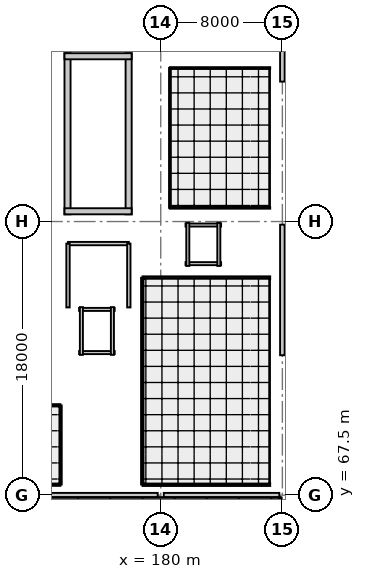
"""IFC4 building model, lengths in metres.
Left out: names, types, materials, properties, quantities, classifications, styles, units other than length and angle.
Written with IfcOpenShell. Run it as: python <this file> out.ifc"""

import sys

from ifc_helpers import new_model, si_unit, direction, frame, frame_2d, origin, origin_2d, place, context, subcontext, project, spatial, rectangle, i_section, extrude, element, fill, save


model = new_model("IFC4")
c1 = context("Model", 3, precision=1e-05, world=origin(), true_north=direction((0.0, 1.0)))
c2 = subcontext(c1, "Body", "Model", "MODEL_VIEW")
j1 = project(units=[si_unit("LENGTHUNIT", "METRE"), si_unit("PLANEANGLEUNIT", "RADIAN")], contexts=[c1])
p1 = place(None, origin())
s1 = spatial("IfcSite", under=j1, at=p1, CompositionType="ELEMENT")
p2 = place(p1, origin())
s2 = spatial("IfcBuilding", under=s1, at=p2, CompositionType="ELEMENT")
p3 = place(p2, frame((0.0, 0.0, 10.8)))
s3 = spatial("IfcBuildingStorey", under=s2, at=p3, CompositionType="ELEMENT", Elevation=10.8)
for number, where, z_axis, x_axis in (
    (1, (180.0, 67.5, 0.0), (0.0, 0.0, 1.0), (1.0, 0.0, 0.0)),
    (2, (180.0, 76.5, 0.0), (0.0, 0.0, 1.0), (1.0, 0.0, 0.0)),
    (3, (180.0, 85.5, 0.0), (0.0, 0.0, 1.0), (1.0, 0.0, 0.0)),
    (4, (180.0, 94.5, 0.0), (0.0, 0.0, 1.0), (1.0, 0.0, 0.0)),
    (5, (188.0, 67.5, 0.0), (0.0, 0.0, 1.0), (1.0, 0.0, 0.0)),
    (6, (188.0, 76.5, 0.0), (0.0, 0.0, 1.0), (1.0, 0.0, 0.0)),
    (7, (188.0, 85.5, 0.0), (0.0, 0.0, 1.0), (1.0, 0.0, 0.0)),
    (8, (188.0, 94.5, 0.0), (0.0, 0.0, 1.0), (1.0, 0.0, 0.0)),
):
    element("IfcColumn", number, at=place(p3, frame(where, z_axis=z_axis, x_axis=x_axis)), inside=s3, PredefinedType="COLUMN", context=c2, shape_type="SweptSolid", body=[
        extrude(i_section(OverallWidth=0.4, OverallDepth=0.408, WebThickness=0.021, FlangeThickness=0.021, FilletRadius=0.022, at=origin_2d()), origin(), (0.0, 0.0, 1.0), 3.6),
    ])
p4 = place(p3, frame((187.8, 67.5, 0.0), z_axis=(0.0, 0.0, 1.0), x_axis=(-1.0, 0.0, 0.0)))
e9 = element("IfcWall", 9, at=p4, inside=s3, PredefinedType="SOLIDWALL", context=c2, shape_type="SweptSolid", body=[
    extrude(rectangle(XDim=7.6, YDim=0.3, at=frame_2d((3.8, 0.0))), origin(), (0.0, 0.0, 1.0), 2.895),
])
p5 = place(p4, frame((2.75, 0.0, 0.9)))
e10 = element("IfcOpeningElement", 10, at=p5, cuts=e9, PredefinedType="OPENING", context=c2, shape_type="SweptSolid", body=[
    extrude(rectangle(XDim=2.1, YDim=1.6, at=frame_2d((1.05, 0.8))), frame((0.0, 0.16, 0.0), z_axis=(0.0, -1.0, 0.0), x_axis=(1.0, 0.0, 0.0)), (0.0, 0.0, 1.0), 0.32),
])
p6 = place(p3, frame((179.8, 67.5, 0.0), z_axis=(0.0, 0.0, 1.0), x_axis=(-1.0, 0.0, 0.0)))
e11 = element("IfcWall", 11, at=p6, inside=s3, PredefinedType="SOLIDWALL", context=c2, shape_type="SweptSolid", body=[
    extrude(rectangle(XDim=7.6, YDim=0.3, at=frame_2d((3.8, 0.0))), origin(), (0.0, 0.0, 1.0), 2.915),
])
p7 = place(p6, frame((2.9, 0.0, 0.9)))
e12 = element("IfcOpeningElement", 12, at=p7, cuts=e11, PredefinedType="OPENING", context=c2, shape_type="SweptSolid", body=[
    extrude(rectangle(XDim=1.8, YDim=1.6, at=frame_2d((0.9, 0.8))), frame((0.0, 0.16, 0.0), z_axis=(0.0, -1.0, 0.0), x_axis=(1.0, 0.0, 0.0)), (0.0, 0.0, 1.0), 0.32),
])
p8 = place(p3, frame((188.0, 85.296, 0.0), z_axis=(0.0, 0.0, 1.0), x_axis=(0.0, -1.0, 0.0)))
e13 = element("IfcWall", 13, at=p8, inside=s3, PredefinedType="SOLIDWALL", context=c2, shape_type="SweptSolid", body=[
    extrude(rectangle(XDim=8.592, YDim=0.3, at=frame_2d((4.296, 0.0))), origin(), (0.0, 0.0, 1.0), 2.895),
])
p9 = place(p8, frame((1.811, 0.0, 0.9)))
e14 = element("IfcOpeningElement", 14, at=p9, cuts=e13, PredefinedType="OPENING", context=c2, shape_type="SweptSolid", body=[
    extrude(rectangle(XDim=0.9, YDim=1.4, at=frame_2d((0.45, 0.7))), frame((0.0, 0.16, 0.0), z_axis=(0.0, -1.0, 0.0), x_axis=(1.0, 0.0, 0.0)), (0.0, 0.0, 1.0), 0.32),
])
p10 = place(p8, frame((5.756, 0.0, 0.9)))
e15 = element("IfcOpeningElement", 15, at=p10, cuts=e13, PredefinedType="OPENING", context=c2, shape_type="SweptSolid", body=[
    extrude(rectangle(XDim=1.15, YDim=1.45, at=frame_2d((0.575, 0.725))), frame((0.0, 0.16, 0.0), z_axis=(0.0, -1.0, 0.0), x_axis=(1.0, 0.0, 0.0)), (0.0, 0.0, 1.0), 0.32),
])
p11 = place(p3, frame((188.0, 103.296, 0.0), z_axis=(0.0, 0.0, 1.0), x_axis=(0.0, -1.0, 0.0)))
e16 = element("IfcWall", 16, at=p11, inside=s3, PredefinedType="SOLIDWALL", context=c2, shape_type="SweptSolid", body=[
    extrude(rectangle(XDim=8.592, YDim=0.3, at=frame_2d((4.296, 0.0))), origin(), (0.0, 0.0, 1.0), 2.775),
])
p12 = place(p11, frame((1.686, 0.0, 0.9)))
e17 = element("IfcOpeningElement", 17, at=p12, cuts=e16, PredefinedType="OPENING", context=c2, shape_type="SweptSolid", body=[
    extrude(rectangle(XDim=1.15, YDim=1.45, at=frame_2d((0.575, 0.725))), frame((0.0, 0.16, 0.0), z_axis=(0.0, -1.0, 0.0), x_axis=(1.0, 0.0, 0.0)), (0.0, 0.0, 1.0), 0.32),
])
p13 = place(p11, frame((5.756, 0.0, 0.9)))
e18 = element("IfcOpeningElement", 18, at=p13, cuts=e16, PredefinedType="OPENING", context=c2, shape_type="SweptSolid", body=[
    extrude(rectangle(XDim=1.15, YDim=1.45, at=frame_2d((0.575, 0.725))), frame((0.0, 0.16, 0.0), z_axis=(0.0, -1.0, 0.0), x_axis=(1.0, 0.0, 0.0)), (0.0, 0.0, 1.0), 0.32),
])
p14 = place(p3, frame((187.85, 54.15, 0.0), z_axis=(0.0, 0.0, 1.0), x_axis=(0.0, 1.0, 0.0)))
e19 = element("IfcWall", 19, at=p14, inside=s3, PredefinedType="PARAPET", context=c2, shape_type="SweptSolid", body=[
    extrude(rectangle(XDim=13.2, YDim=0.21, at=frame_2d((6.6, 0.0))), origin(), (0.0, 0.0, 1.0), 1.2),
])
for number, where, z_axis, x_axis in (
    (20, (177.887, 85.975, 0.0), (0.0, 0.0, 1.0), (0.0, 1.0, 0.0)),
    (21, (173.867, 96.573, 0.0), (0.0, 0.0, 1.0), (0.0, -1.0, 0.0)),
):
    element("IfcWall", number, at=place(p3, frame(where, z_axis=z_axis, x_axis=x_axis)), inside=s3, PredefinedType="SHEAR", context=c2, shape_type="SweptSolid", body=[
        extrude(rectangle(XDim=10.597, YDim=0.4, at=frame_2d((5.299, 0.0))), origin(), (0.0, 0.0, 1.0), 3.38),
    ])
p15 = place(p3, frame((178.087, 96.373, 0.0), z_axis=(0.0, 0.0, 1.0), x_axis=(-1.0, 0.0, 0.0)))
e22 = element("IfcWall", 22, at=p15, inside=s3, PredefinedType="SHEAR", context=c2, shape_type="SweptSolid", body=[
    extrude(rectangle(XDim=4.42, YDim=0.4, at=frame_2d((2.21, 0.0))), origin(), (0.0, 0.0, 1.0), 3.38),
])
p16 = place(p3, frame((173.667, 86.175, 0.0), z_axis=(0.0, 0.0, 1.0), x_axis=(1.0, 0.0, 0.0)))
e23 = element("IfcWall", 23, at=p16, inside=s3, PredefinedType="SHEAR", context=c2, shape_type="SweptSolid", body=[
    extrude(rectangle(XDim=4.42, YDim=0.4, at=frame_2d((2.21, 0.0))), origin(), (0.0, 0.0, 1.0), 3.38),
])
p17 = place(p16, frame((1.15, 0.0, 0.0)))
e24 = element("IfcOpeningElement", 24, at=p17, cuts=e23, PredefinedType="OPENING", context=c2, shape_type="SweptSolid", body=[
    extrude(rectangle(XDim=1.3, YDim=2.1, at=frame_2d((0.65, 1.05))), frame((0.0, 0.21, 0.0), z_axis=(0.0, -1.0, 0.0), x_axis=(1.0, 0.0, 0.0)), (0.0, 0.0, 1.0), 0.42),
])
p18 = place(p3, frame((174.63, 76.88, 0.0), z_axis=(0.0, 0.0, 1.0), x_axis=(1.0, 0.0, 0.0)))
e25 = element("IfcWall", 25, at=p18, inside=s3, PredefinedType="SOLIDWALL", context=c2, shape_type="SweptSolid", body=[
    extrude(rectangle(XDim=2.34, YDim=0.2, at=frame_2d((1.17, 0.0))), origin(), (0.0, 0.0, 1.0), 2.915),
])
p19 = place(p3, frame((176.97, 79.72, 0.0), z_axis=(0.0, 0.0, 1.0), x_axis=(-1.0, 0.0, 0.0)))
e26 = element("IfcWall", 26, at=p19, inside=s3, PredefinedType="SOLIDWALL", context=c2, shape_type="SweptSolid", body=[
    extrude(rectangle(XDim=2.34, YDim=0.2, at=frame_2d((1.17, 0.0))), origin(), (0.0, 0.0, 1.0), 3.355),
])
p20 = place(p19, frame((0.57, 0.0, 0.0)))
e27 = element("IfcOpeningElement", 27, at=p20, cuts=e26, PredefinedType="OPENING", context=c2, shape_type="SweptSolid", body=[
    extrude(rectangle(XDim=1.2, YDim=2.15, at=frame_2d((0.6, 1.075))), frame((0.0, 0.11, 0.0), z_axis=(0.0, -1.0, 0.0), x_axis=(1.0, 0.0, 0.0)), (0.0, 0.0, 1.0), 0.22),
])
for number, where, z_axis, x_axis in (
    (28, (174.78, 79.87, 0.0), (0.0, 0.0, 1.0), (0.0, -1.0, 0.0)),
    (29, (176.82, 76.73, 0.0), (0.0, 0.0, 1.0), (0.0, 1.0, 0.0)),
):
    element("IfcWall", number, at=place(p3, frame(where, z_axis=z_axis, x_axis=x_axis)), inside=s3, PredefinedType="SOLIDWALL", context=c2, shape_type="SweptSolid", body=[
        extrude(rectangle(XDim=3.14, YDim=0.2, at=frame_2d((1.57, 0.0))), origin(), (0.0, 0.0, 1.0), 2.915),
    ])
p21 = place(p3, frame((181.63, 82.73, 0.0), z_axis=(0.0, 0.0, 1.0), x_axis=(1.0, 0.0, 0.0)))
e30 = element("IfcWall", 30, at=p21, inside=s3, PredefinedType="SOLIDWALL", context=c2, shape_type="SweptSolid", body=[
    extrude(rectangle(XDim=2.34, YDim=0.2, at=frame_2d((1.17, 0.0))), origin(), (0.0, 0.0, 1.0), 3.355),
])
p22 = place(p3, frame((183.97, 85.27, 0.0), z_axis=(0.0, 0.0, 1.0), x_axis=(-1.0, 0.0, 0.0)))
e31 = element("IfcWall", 31, at=p22, inside=s3, PredefinedType="SOLIDWALL", context=c2, shape_type="SweptSolid", body=[
    extrude(rectangle(XDim=2.34, YDim=0.2, at=frame_2d((1.17, 0.0))), origin(), (0.0, 0.0, 1.0), 2.915),
])
p23 = place(p22, frame((0.62, 0.0, 0.0)))
e32 = element("IfcOpeningElement", 32, at=p23, cuts=e31, PredefinedType="OPENING", context=c2, shape_type="SweptSolid", body=[
    extrude(rectangle(XDim=1.1, YDim=2.15, at=frame_2d((0.55, 1.075))), frame((0.0, 0.11, 0.0), z_axis=(0.0, -1.0, 0.0), x_axis=(1.0, 0.0, 0.0)), (0.0, 0.0, 1.0), 0.22),
])
for number, where, z_axis, x_axis in (
    (33, (181.78, 85.42, 0.0), (0.0, 0.0, 1.0), (0.0, -1.0, 0.0)),
    (34, (183.82, 82.58, 0.0), (0.0, 0.0, 1.0), (0.0, 1.0, 0.0)),
):
    element("IfcWall", number, at=place(p3, frame(where, z_axis=z_axis, x_axis=x_axis)), inside=s3, PredefinedType="SOLIDWALL", context=c2, shape_type="SweptSolid", body=[
        extrude(rectangle(XDim=2.84, YDim=0.2, at=frame_2d((1.42, 0.0))), origin(), (0.0, 0.0, 1.0), 2.915),
    ])
p24 = place(p3, frame((173.4, 68.2, 0.0), z_axis=(0.0, 0.0, 1.0), x_axis=(-1.0, 0.0, 0.0)))
e35 = element("IfcWall", 35, at=p24, inside=s3, PredefinedType="PARTITIONING", context=c2, shape_type="SweptSolid", body=[
    extrude(rectangle(XDim=4.0, YDim=0.175, at=frame_2d((2.0, 0.0))), origin(), (0.0, 0.0, 1.0), 2.915),
])
p25 = place(p3, frame((169.4, 73.4, 0.0), z_axis=(0.0, 0.0, 1.0), x_axis=(1.0, 0.0, 0.0)))
e36 = element("IfcWall", 36, at=p25, inside=s3, PredefinedType="PARTITIONING", context=c2, shape_type="SweptSolid", body=[
    extrude(rectangle(XDim=4.0, YDim=0.175, at=frame_2d((2.0, 0.0))), origin(), (0.0, 0.0, 1.0), 2.965),
])
p26 = place(p3, frame((173.4, 73.4, 0.0), z_axis=(0.0, 0.0, 1.0), x_axis=(0.0, -1.0, 0.0)))
e37 = element("IfcWall", 37, at=p26, inside=s3, PredefinedType="PARTITIONING", context=c2, shape_type="SweptSolid", body=[
    extrude(rectangle(XDim=5.2, YDim=0.175, at=frame_2d((2.6, 0.0))), origin(), (0.0, 0.0, 1.0), 2.915),
])
p27 = place(p3, frame((187.2, 86.4, 0.0), z_axis=(0.0, 0.0, 1.0), x_axis=(-1.0, 0.0, 0.0)))
e38 = element("IfcWall", 38, at=p27, inside=s3, PredefinedType="PARTITIONING", context=c2, shape_type="SweptSolid", body=[
    extrude(rectangle(XDim=6.6, YDim=0.11, at=frame_2d((3.3, 0.0))), origin(), (0.0, 0.0, 1.0), 2.895),
])
p28 = place(p3, frame((180.6, 95.6, 0.0), z_axis=(0.0, 0.0, 1.0), x_axis=(1.0, 0.0, 0.0)))
e39 = element("IfcWall", 39, at=p28, inside=s3, PredefinedType="PARTITIONING", context=c2, shape_type="SweptSolid", body=[
    extrude(rectangle(XDim=6.6, YDim=0.11, at=frame_2d((3.3, 0.0))), origin(), (0.0, 0.0, 1.0), 2.895),
])
p29 = place(p28, frame((2.7, 0.0, 0.0)))
e40 = element("IfcOpeningElement", 40, at=p29, cuts=e39, PredefinedType="OPENING", context=c2, shape_type="SweptSolid", body=[
    extrude(rectangle(XDim=1.2, YDim=2.1, at=frame_2d((0.6, 1.05))), frame((0.0, 0.065, 0.0), z_axis=(0.0, -1.0, 0.0), x_axis=(1.0, 0.0, 0.0)), (0.0, 0.0, 1.0), 0.13),
])
p30 = place(p3, frame((180.6, 86.4, 0.0), z_axis=(0.0, 0.0, 1.0), x_axis=(0.0, 1.0, 0.0)))
e41 = element("IfcWall", 41, at=p30, inside=s3, PredefinedType="PARTITIONING", context=c2, shape_type="SweptSolid", body=[
    extrude(rectangle(XDim=9.2, YDim=0.11, at=frame_2d((4.6, 0.0))), origin(), (0.0, 0.0, 1.0), 2.915),
])
for number, where, z_axis, x_axis in (
    (42, (187.2, 68.2, 0.0), (0.0, 0.0, 1.0), (-1.0, 0.0, 0.0)),
    (43, (178.8, 81.8, 0.0), (0.0, 0.0, 1.0), (1.0, 0.0, 0.0)),
):
    element("IfcWall", number, at=place(p3, frame(where, z_axis=z_axis, x_axis=x_axis)), inside=s3, PredefinedType="PARTITIONING", context=c2, shape_type="SweptSolid", body=[
        extrude(rectangle(XDim=8.4, YDim=0.19, at=frame_2d((4.2, 0.0))), origin(), (0.0, 0.0, 1.0), 2.895),
    ])
p31 = place(p3, frame((178.8, 68.2, 0.0), z_axis=(0.0, 0.0, 1.0), x_axis=(0.0, 1.0, 0.0)))
e44 = element("IfcWall", 44, at=p31, inside=s3, PredefinedType="PARTITIONING", context=c2, shape_type="SweptSolid", body=[
    extrude(rectangle(XDim=13.6, YDim=0.19, at=frame_2d((6.8, 0.0))), origin(), (0.0, 0.0, 1.0), 2.915),
])
p32 = place(p31, frame((6.225, 0.0, 0.0)))
e45 = element("IfcOpeningElement", 45, at=p32, cuts=e44, PredefinedType="OPENING", context=c2, shape_type="SweptSolid", body=[
    extrude(rectangle(XDim=1.15, YDim=2.1, at=frame_2d((0.575, 1.05))), frame((0.0, 0.105, 0.0), z_axis=(0.0, -1.0, 0.0), x_axis=(1.0, 0.0, 0.0)), (0.0, 0.0, 1.0), 0.21),
])
p33 = place(p3, frame((173.9, 84.05, 0.0), z_axis=(0.0, 0.0, 1.0), x_axis=(1.0, 0.0, 0.0)))
e46 = element("IfcWall", 46, at=p33, inside=s3, PredefinedType="SOLIDWALL", context=c2, shape_type="SweptSolid", body=[
    extrude(rectangle(XDim=4.0, YDim=0.22, at=frame_2d((2.0, 0.0))), origin(), (0.0, 0.0, 1.0), 3.355),
])
p34 = place(p3, frame((173.9, 79.85, 0.0), z_axis=(0.0, 0.0, 1.0), x_axis=(0.0, 1.0, 0.0)))
e47 = element("IfcWall", 47, at=p34, inside=s3, PredefinedType="SOLIDWALL", context=c2, shape_type="SweptSolid", body=[
    extrude(rectangle(XDim=4.2, YDim=0.22, at=frame_2d((2.1, 0.0))), origin(), (0.0, 0.0, 1.0), 3.355),
])
p35 = place(p34, frame((1.4, 0.0, 0.0)))
e48 = element("IfcOpeningElement", 48, at=p35, cuts=e47, PredefinedType="OPENING", context=c2, shape_type="SweptSolid", body=[
    extrude(rectangle(XDim=1.4, YDim=2.1, at=frame_2d((0.7, 1.05))), frame((0.0, 0.12, 0.0), z_axis=(0.0, -1.0, 0.0), x_axis=(1.0, 0.0, 0.0)), (0.0, 0.0, 1.0), 0.24),
])
p36 = place(p3, frame((177.9, 84.05, 0.0), z_axis=(0.0, 0.0, 1.0), x_axis=(0.0, -1.0, 0.0)))
e49 = element("IfcWall", 49, at=p36, inside=s3, PredefinedType="SOLIDWALL", context=c2, shape_type="SweptSolid", body=[
    extrude(rectangle(XDim=4.2, YDim=0.22, at=frame_2d((2.1, 0.0))), origin(), (0.0, 0.0, 1.0), 3.355),
])
p37 = place(p5, origin())
e50 = element("IfcWindow", 50, at=p37, inside=s3, PartitioningType="SINGLE_PANEL", PredefinedType="WINDOW", context=c2, shape_type="SweptSolid", body=[
    extrude(rectangle(XDim=2.1, YDim=1.6, at=frame_2d((1.05, 0.8))), frame((0.0, 0.03, 0.0), z_axis=(0.0, -1.0, 0.0), x_axis=(1.0, 0.0, 0.0)), (0.0, 0.0, 1.0), 0.06),
])
fill(e10, e50)
p38 = place(p7, origin())
e51 = element("IfcWindow", 51, at=p38, inside=s3, PartitioningType="SINGLE_PANEL", PredefinedType="WINDOW", context=c2, shape_type="SweptSolid", body=[
    extrude(rectangle(XDim=1.8, YDim=1.6, at=frame_2d((0.9, 0.8))), frame((0.0, 0.03, 0.0), z_axis=(0.0, -1.0, 0.0), x_axis=(1.0, 0.0, 0.0)), (0.0, 0.0, 1.0), 0.06),
])
fill(e12, e51)
p39 = place(p9, origin())
e52 = element("IfcWindow", 52, at=p39, inside=s3, PartitioningType="SINGLE_PANEL", PredefinedType="WINDOW", context=c2, shape_type="SweptSolid", body=[
    extrude(rectangle(XDim=0.9, YDim=1.4, at=frame_2d((0.45, 0.7))), frame((0.0, 0.03, 0.0), z_axis=(0.0, -1.0, 0.0), x_axis=(1.0, 0.0, 0.0)), (0.0, 0.0, 1.0), 0.06),
])
fill(e14, e52)
p40 = place(p10, origin())
e53 = element("IfcWindow", 53, at=p40, inside=s3, PartitioningType="SINGLE_PANEL", PredefinedType="WINDOW", context=c2, shape_type="SweptSolid", body=[
    extrude(rectangle(XDim=1.15, YDim=1.45, at=frame_2d((0.575, 0.725))), frame((0.0, 0.03, 0.0), z_axis=(0.0, -1.0, 0.0), x_axis=(1.0, 0.0, 0.0)), (0.0, 0.0, 1.0), 0.06),
])
fill(e15, e53)
p41 = place(p13, origin())
e54 = element("IfcWindow", 54, at=p41, inside=s3, PartitioningType="SINGLE_PANEL", PredefinedType="WINDOW", context=c2, shape_type="SweptSolid", body=[
    extrude(rectangle(XDim=1.15, YDim=1.45, at=frame_2d((0.575, 0.725))), frame((0.0, 0.03, 0.0), z_axis=(0.0, -1.0, 0.0), x_axis=(1.0, 0.0, 0.0)), (0.0, 0.0, 1.0), 0.06),
])
fill(e18, e54)
p42 = place(p17, origin())
e55 = element("IfcDoor", 55, at=p42, inside=s3, OperationType="SINGLE_SWING_RIGHT", PredefinedType="DOOR", context=c2, shape_type="SweptSolid", body=[
    extrude(rectangle(XDim=1.3, YDim=2.1, at=frame_2d((0.65, 1.05))), frame((0.0, 0.025, 0.0), z_axis=(0.0, -1.0, 0.0), x_axis=(1.0, 0.0, 0.0)), (0.0, 0.0, 1.0), 0.05),
])
fill(e24, e55)
p43 = place(p20, origin())
e56 = element("IfcDoor", 56, at=p43, inside=s3, OperationType="SLIDING_TO_LEFT", PredefinedType="DOOR", context=c2, shape_type="SweptSolid", body=[
    extrude(rectangle(XDim=1.2, YDim=2.15, at=frame_2d((0.6, 1.075))), frame((0.0, 0.025, 0.0), z_axis=(0.0, -1.0, 0.0), x_axis=(1.0, 0.0, 0.0)), (0.0, 0.0, 1.0), 0.05),
])
fill(e27, e56)
p44 = place(p23, origin())
e57 = element("IfcDoor", 57, at=p44, inside=s3, OperationType="SLIDING_TO_LEFT", PredefinedType="DOOR", context=c2, shape_type="SweptSolid", body=[
    extrude(rectangle(XDim=1.1, YDim=2.15, at=frame_2d((0.55, 1.075))), frame((0.0, 0.025, 0.0), z_axis=(0.0, -1.0, 0.0), x_axis=(1.0, 0.0, 0.0)), (0.0, 0.0, 1.0), 0.05),
])
fill(e32, e57)
p45 = place(p29, origin())
e58 = element("IfcDoor", 58, at=p45, inside=s3, OperationType="SINGLE_SWING_RIGHT", PredefinedType="DOOR", context=c2, shape_type="SweptSolid", body=[
    extrude(rectangle(XDim=1.2, YDim=2.1, at=frame_2d((0.6, 1.05))), frame((0.0, 0.025, 0.0), z_axis=(0.0, -1.0, 0.0), x_axis=(1.0, 0.0, 0.0)), (0.0, 0.0, 1.0), 0.05),
])
fill(e40, e58)
p46 = place(p32, origin())
e59 = element("IfcDoor", 59, at=p46, inside=s3, OperationType="SINGLE_SWING_RIGHT", PredefinedType="DOOR", context=c2, shape_type="SweptSolid", body=[
    extrude(rectangle(XDim=1.15, YDim=2.1, at=frame_2d((0.575, 1.05))), frame((0.0, 0.025, 0.0), z_axis=(0.0, -1.0, 0.0), x_axis=(1.0, 0.0, 0.0)), (0.0, 0.0, 1.0), 0.05),
])
fill(e45, e59)
p47 = place(p35, origin())
e60 = element("IfcDoor", 60, at=p47, inside=s3, OperationType="SINGLE_SWING_LEFT", PredefinedType="DOOR", context=c2, shape_type="SweptSolid", body=[
    extrude(rectangle(XDim=1.4, YDim=2.1, at=frame_2d((0.7, 1.05))), frame((0.0, 0.025, 0.0), z_axis=(0.0, -1.0, 0.0), x_axis=(1.0, 0.0, 0.0)), (0.0, 0.0, 1.0), 0.05),
])
fill(e48, e60)
save(model, sys.argv[1])
